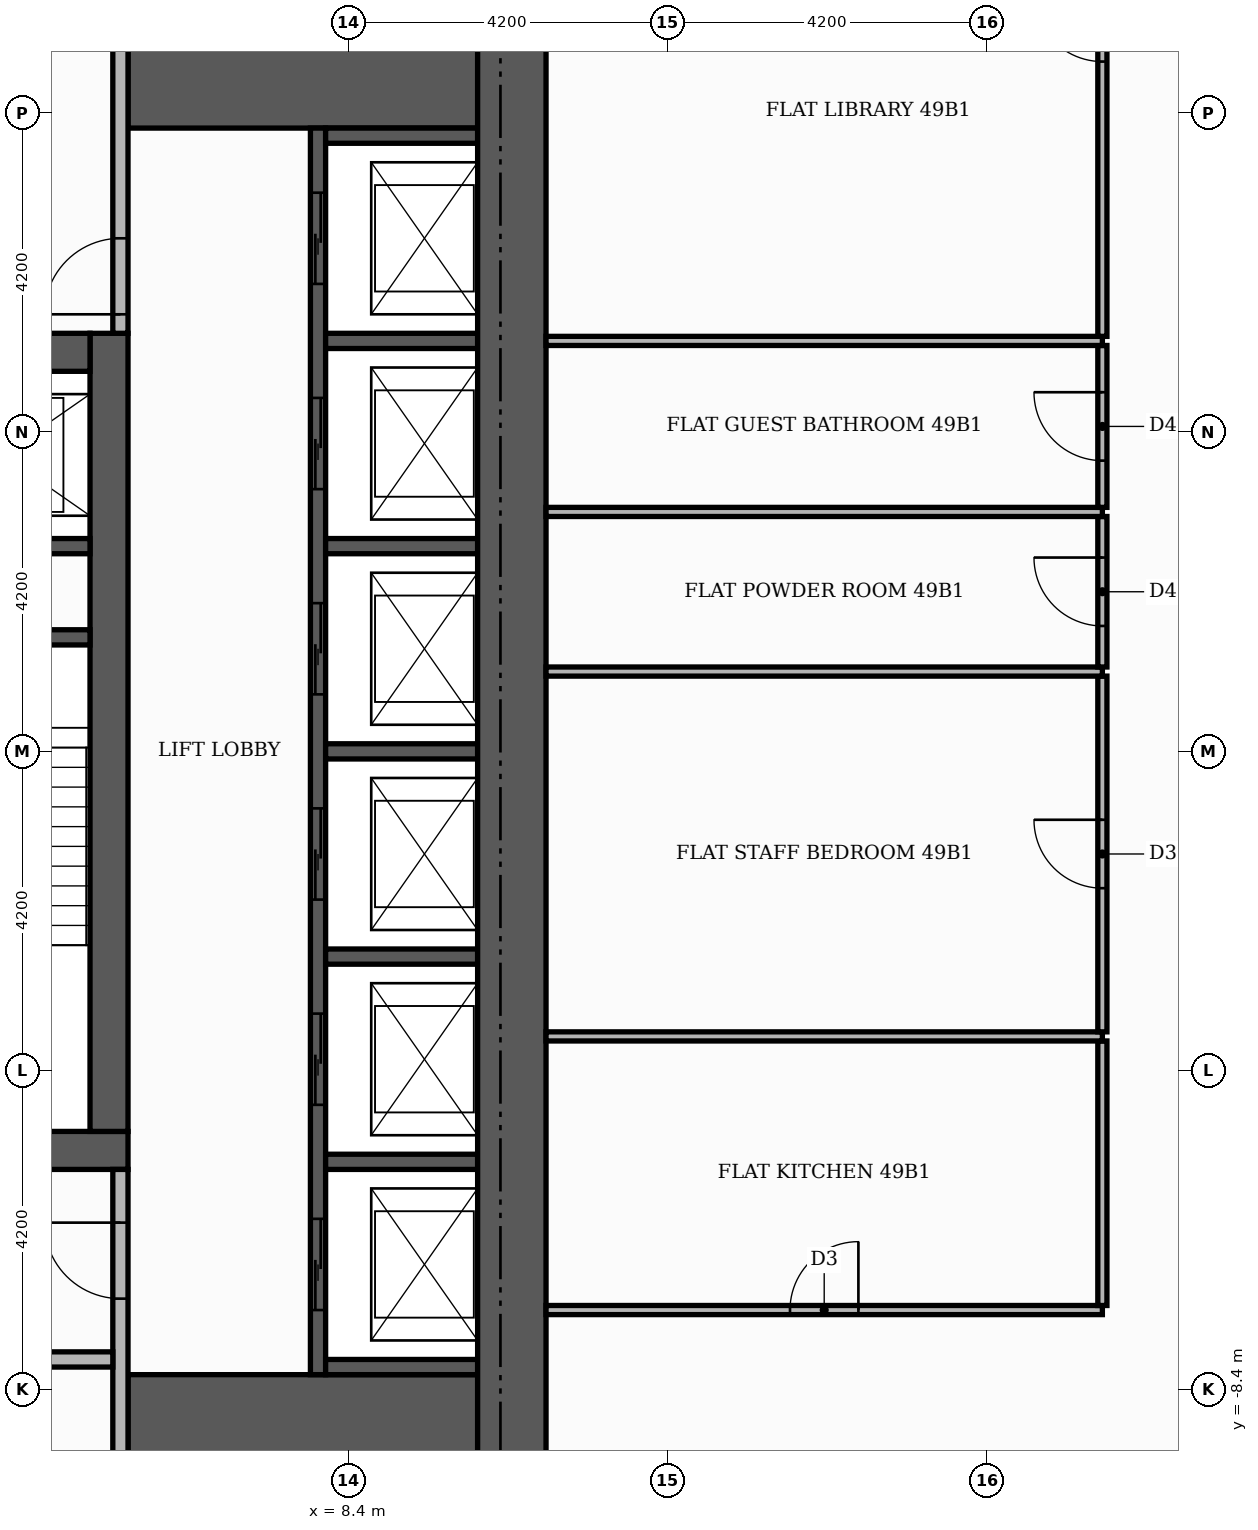
"""IFC4 building model, lengths in metres.
Left out: names, types, materials, properties, quantities, classifications, styles, units other than length and angle.
Written with IfcOpenShell. Run it as: python <this file> out.ifc"""

import sys

from ifc_helpers import new_model, si_unit, direction, frame, frame_2d, origin, place, context, subcontext, project, spatial, rectangle, extrude, element, fill, save


model = new_model("IFC4")
c1 = context("Model", 3, precision=1e-05, world=origin(), true_north=direction((0.0, 1.0)))
c2 = subcontext(c1, "Body", "Model", "MODEL_VIEW")
j1 = project(units=[si_unit("LENGTHUNIT", "METRE"), si_unit("PLANEANGLEUNIT", "RADIAN")], contexts=[c1])
p1 = place(None, origin())
s1 = spatial("IfcSite", under=j1, at=p1, CompositionType="ELEMENT")
p2 = place(p1, origin())
s2 = spatial("IfcBuilding", under=s1, at=p2, CompositionType="ELEMENT")
p3 = place(p2, frame((0.0, 0.0, 207.9)))
s3 = spatial("IfcBuildingStorey", under=s2, at=p3, CompositionType="ELEMENT", Elevation=207.9)
p4 = place(p3, frame((-5.5, -5.25, 0.0), z_axis=(0.0, 0.0, 1.0), x_axis=(1.0, 0.0, 0.0)))
e1 = element("IfcWall", 1, at=p4, inside=s3, PredefinedType="SHEAR", context=c2, shape_type="SweptSolid", body=[
    extrude(rectangle(XDim=11.0, YDim=0.5, at=frame_2d((5.5, 0.0))), origin(), (0.0, 0.0, 1.0), 3.48),
])
p5 = place(p4, frame((4.9, 0.0, 0.0)))
e2 = element("IfcOpeningElement", 2, at=p5, cuts=e1, PredefinedType="OPENING", context=c2, shape_type="SweptSolid", body=[
    extrude(rectangle(XDim=1.2, YDim=2.1, at=frame_2d((0.6, 1.05))), frame((0.0, 0.26, 0.0), z_axis=(0.0, -1.0, 0.0), x_axis=(1.0, 0.0, 0.0)), (0.0, 0.0, 1.0), 0.52),
])
p6 = place(p3, frame((5.25, -5.0, 0.0), z_axis=(0.0, 0.0, 1.0), x_axis=(0.0, 1.0, 0.0)))
e3 = element("IfcWall", 3, at=p6, inside=s3, PredefinedType="SHEAR", context=c2, shape_type="SweptSolid", body=[
    extrude(rectangle(XDim=10.5, YDim=0.5, at=frame_2d((5.25, 0.0))), origin(), (0.0, 0.0, 1.0), 3.48),
])
p7 = place(p3, frame((-5.0, 5.25, 0.0), z_axis=(0.0, 0.0, 1.0), x_axis=(1.0, 0.0, 0.0)))
e4 = element("IfcWall", 4, at=p7, inside=s3, PredefinedType="SHEAR", context=c2, shape_type="SweptSolid", body=[
    extrude(rectangle(XDim=10.0, YDim=0.5, at=frame_2d((5.0, 0.0))), origin(), (0.0, 0.0, 1.0), 3.48),
])
p8 = place(p7, frame((4.4, 0.0, 0.0)))
e5 = element("IfcOpeningElement", 5, at=p8, cuts=e4, PredefinedType="OPENING", context=c2, shape_type="SweptSolid", body=[
    extrude(rectangle(XDim=1.2, YDim=2.1, at=frame_2d((0.6, 1.05))), frame((0.0, 0.26, 0.0), z_axis=(0.0, -1.0, 0.0), x_axis=(1.0, 0.0, 0.0)), (0.0, 0.0, 1.0), 0.52),
])
for number, where, z_axis, x_axis in (
    (6, (5.5, -9.15, 0.0), (0.0, 0.0, 1.0), (1.0, 0.0, 0.0)),
    (7, (5.5, 9.15, 0.0), (0.0, 0.0, 1.0), (1.0, 0.0, 0.0)),
):
    element("IfcWall", number, at=place(p3, frame(where, z_axis=z_axis, x_axis=x_axis)), inside=s3, PredefinedType="SHEAR", context=c2, shape_type="SweptSolid", body=[
        extrude(rectangle(XDim=4.6, YDim=1.9, at=frame_2d((2.3, 0.0))), origin(), (0.0, 0.0, 1.0), 3.48),
    ])
p9 = place(p3, frame((2.15, 1.5, 0.0), z_axis=(0.0, 0.0, 1.0), x_axis=(1.0, 0.0, 0.0)))
e8 = element("IfcWall", 8, at=p9, inside=s3, PredefinedType="SHEAR", context=c2, shape_type="SweptSolid", body=[
    extrude(rectangle(XDim=2.85, YDim=0.2, at=frame_2d((1.425, 0.0))), origin(), (0.0, 0.0, 1.0), 3.48),
])
p10 = place(p3, frame((8.0, -8.2, 0.0), z_axis=(0.0, 0.0, 1.0), x_axis=(0.0, 1.0, 0.0)))
e9 = element("IfcWall", 9, at=p10, inside=s3, PredefinedType="SHEAR", context=c2, shape_type="SweptSolid", body=[
    extrude(rectangle(XDim=16.4, YDim=0.2, at=frame_2d((8.2, 0.0))), origin(), (0.0, 0.0, 1.0), 3.48),
])
p11 = place(p10, frame((0.85, 0.0, 0.0)))
e10 = element("IfcOpeningElement", 10, at=p11, cuts=e9, PredefinedType="OPENING", context=c2, shape_type="SweptSolid", body=[
    extrude(rectangle(XDim=1.2, YDim=2.1, at=frame_2d((0.6, 1.05))), frame((0.0, 0.11, 0.0), z_axis=(0.0, -1.0, 0.0), x_axis=(1.0, 0.0, 0.0)), (0.0, 0.0, 1.0), 0.22),
])
p12 = place(p10, frame((3.55, 0.0, 0.0)))
e11 = element("IfcOpeningElement", 11, at=p12, cuts=e9, PredefinedType="OPENING", context=c2, shape_type="SweptSolid", body=[
    extrude(rectangle(XDim=1.2, YDim=2.1, at=frame_2d((0.6, 1.05))), frame((0.0, 0.11, 0.0), z_axis=(0.0, -1.0, 0.0), x_axis=(1.0, 0.0, 0.0)), (0.0, 0.0, 1.0), 0.22),
])
p13 = place(p10, frame((6.25, 0.0, 0.0)))
e12 = element("IfcOpeningElement", 12, at=p13, cuts=e9, PredefinedType="OPENING", context=c2, shape_type="SweptSolid", body=[
    extrude(rectangle(XDim=1.2, YDim=2.1, at=frame_2d((0.6, 1.05))), frame((0.0, 0.11, 0.0), z_axis=(0.0, -1.0, 0.0), x_axis=(1.0, 0.0, 0.0)), (0.0, 0.0, 1.0), 0.22),
])
p14 = place(p10, frame((8.95, 0.0, 0.0)))
e13 = element("IfcOpeningElement", 13, at=p14, cuts=e9, PredefinedType="OPENING", context=c2, shape_type="SweptSolid", body=[
    extrude(rectangle(XDim=1.2, YDim=2.1, at=frame_2d((0.6, 1.05))), frame((0.0, 0.11, 0.0), z_axis=(0.0, -1.0, 0.0), x_axis=(1.0, 0.0, 0.0)), (0.0, 0.0, 1.0), 0.22),
])
p15 = place(p10, frame((11.65, 0.0, 0.0)))
e14 = element("IfcOpeningElement", 14, at=p15, cuts=e9, PredefinedType="OPENING", context=c2, shape_type="SweptSolid", body=[
    extrude(rectangle(XDim=1.2, YDim=2.1, at=frame_2d((0.6, 1.05))), frame((0.0, 0.11, 0.0), z_axis=(0.0, -1.0, 0.0), x_axis=(1.0, 0.0, 0.0)), (0.0, 0.0, 1.0), 0.22),
])
p16 = place(p10, frame((14.35, 0.0, 0.0)))
e15 = element("IfcOpeningElement", 15, at=p16, cuts=e9, PredefinedType="OPENING", context=c2, shape_type="SweptSolid", body=[
    extrude(rectangle(XDim=1.2, YDim=2.1, at=frame_2d((0.6, 1.05))), frame((0.0, 0.11, 0.0), z_axis=(0.0, -1.0, 0.0), x_axis=(1.0, 0.0, 0.0)), (0.0, 0.0, 1.0), 0.22),
])
for number, where, z_axis, x_axis in (
    (16, (8.1, -8.1, 0.0), (0.0, 0.0, 1.0), (1.0, 0.0, 0.0)),
    (17, (8.1, -5.4, 0.0), (0.0, 0.0, 1.0), (1.0, 0.0, 0.0)),
    (18, (8.1, -2.7, 0.0), (0.0, 0.0, 1.0), (1.0, 0.0, 0.0)),
    (19, (8.1, 0.0, 0.0), (0.0, 0.0, 1.0), (1.0, 0.0, 0.0)),
):
    element("IfcWall", number, at=place(p3, frame(where, z_axis=z_axis, x_axis=x_axis)), inside=s3, PredefinedType="SHEAR", context=c2, shape_type="SweptSolid", body=[
        extrude(rectangle(XDim=2.0, YDim=0.2, at=frame_2d((1.0, 0.0))), origin(), (0.0, 0.0, 1.0), 3.48),
    ])
p17 = place(p3, frame((2.15, 2.7, 0.0), z_axis=(0.0, 0.0, 1.0), x_axis=(1.0, 0.0, 0.0)))
e20 = element("IfcWall", 20, at=p17, inside=s3, PredefinedType="SHEAR", context=c2, shape_type="SweptSolid", body=[
    extrude(rectangle(XDim=2.85, YDim=0.2, at=frame_2d((1.425, 0.0))), origin(), (0.0, 0.0, 1.0), 3.48),
])
for number, where, z_axis, x_axis in (
    (21, (8.1, 2.7, 0.0), (0.0, 0.0, 1.0), (1.0, 0.0, 0.0)),
    (22, (8.1, 5.4, 0.0), (0.0, 0.0, 1.0), (1.0, 0.0, 0.0)),
    (23, (8.1, 8.1, 0.0), (0.0, 0.0, 1.0), (1.0, 0.0, 0.0)),
):
    element("IfcWall", number, at=place(p3, frame(where, z_axis=z_axis, x_axis=x_axis)), inside=s3, PredefinedType="SHEAR", context=c2, shape_type="SweptSolid", body=[
        extrude(rectangle(XDim=2.0, YDim=0.2, at=frame_2d((1.0, 0.0))), origin(), (0.0, 0.0, 1.0), 3.48),
    ])
p18 = place(p3, frame((10.55, -10.1, 0.0), z_axis=(0.0, 0.0, 1.0), x_axis=(0.0, 1.0, 0.0)))
e24 = element("IfcWall", 24, at=p18, inside=s3, PredefinedType="SHEAR", context=c2, shape_type="SweptSolid", body=[
    extrude(rectangle(XDim=20.2, YDim=0.9, at=frame_2d((10.1, 0.0))), origin(), (0.0, 0.0, 1.0), 3.48),
])
p19 = place(p3, frame((5.4, -10.1, 0.0), z_axis=(0.0, 0.0, 1.0), x_axis=(0.0, 1.0, 0.0)))
e25 = element("IfcWall", 25, at=p19, inside=s3, PredefinedType="PARTITIONING", context=c2, shape_type="SweptSolid", body=[
    extrude(rectangle(XDim=4.6, YDim=0.2, at=frame_2d((2.3, 0.0))), origin(), (0.0, 0.0, 1.0), 3.48),
])
p20 = place(p19, frame((2.9, 0.0, 0.0)))
e26 = element("IfcOpeningElement", 26, at=p20, cuts=e25, PredefinedType="OPENING", context=c2, shape_type="SweptSolid", body=[
    extrude(rectangle(XDim=1.0, YDim=2.1, at=frame_2d((0.5, 1.05))), frame((0.0, 0.11, 0.0), z_axis=(0.0, -1.0, 0.0), x_axis=(1.0, 0.0, 0.0)), (0.0, 0.0, 1.0), 0.22),
])
p21 = place(p3, frame((2.35, -8.0, 0.0), z_axis=(0.0, 0.0, 1.0), x_axis=(1.0, 0.0, 0.0)))
e27 = element("IfcWall", 27, at=p21, inside=s3, PredefinedType="PARTITIONING", context=c2, shape_type="SweptSolid", body=[
    extrude(rectangle(XDim=2.95, YDim=0.2, at=frame_2d((1.475, 0.0))), origin(), (0.0, 0.0, 1.0), 3.48),
])
p22 = place(p21, frame((1.0, 0.0, 0.0)))
e28 = element("IfcOpeningElement", 28, at=p22, cuts=e27, PredefinedType="OPENING", context=c2, shape_type="SweptSolid", body=[
    extrude(rectangle(XDim=0.9, YDim=2.1, at=frame_2d((0.45, 1.05))), frame((0.0, 0.11, 0.0), z_axis=(0.0, -1.0, 0.0), x_axis=(1.0, 0.0, 0.0)), (0.0, 0.0, 1.0), 0.22),
])
p23 = place(p3, frame((5.4, 5.5, 0.0), z_axis=(0.0, 0.0, 1.0), x_axis=(0.0, 1.0, 0.0)))
e29 = element("IfcWall", 29, at=p23, inside=s3, PredefinedType="PARTITIONING", context=c2, shape_type="SweptSolid", body=[
    extrude(rectangle(XDim=4.6, YDim=0.2, at=frame_2d((2.3, 0.0))), origin(), (0.0, 0.0, 1.0), 3.48),
])
p24 = place(p23, frame((0.25, 0.0, 0.0)))
e30 = element("IfcOpeningElement", 30, at=p24, cuts=e29, PredefinedType="OPENING", context=c2, shape_type="SweptSolid", body=[
    extrude(rectangle(XDim=1.0, YDim=2.1, at=frame_2d((0.5, 1.05))), frame((0.0, 0.11, 0.0), z_axis=(0.0, -1.0, 0.0), x_axis=(1.0, 0.0, 0.0)), (0.0, 0.0, 1.0), 0.22),
])
p25 = place(p3, frame((11.0, -7.35, 0.0), z_axis=(0.0, 0.0, 1.0), x_axis=(1.0, 0.0, 0.0)))
e31 = element("IfcWall", 31, at=p25, inside=s3, PredefinedType="PARTITIONING", context=c2, shape_type="SweptSolid", body=[
    extrude(rectangle(XDim=7.32, YDim=0.12, at=frame_2d((3.66, 0.0))), origin(), (0.0, 0.0, 1.0), 3.48),
])
p26 = place(p25, frame((3.21, 0.0, 0.0)))
e32 = element("IfcOpeningElement", 32, at=p26, cuts=e31, PredefinedType="OPENING", context=c2, shape_type="SweptSolid", body=[
    extrude(rectangle(XDim=0.9, YDim=2.1, at=frame_2d((0.45, 1.05))), frame((0.0, 0.07, 0.0), z_axis=(0.0, -1.0, 0.0), x_axis=(1.0, 0.0, 0.0)), (0.0, 0.0, 1.0), 0.14),
])
p27 = place(p3, frame((18.32, -7.29, 0.0), z_axis=(0.0, 0.0, 1.0), x_axis=(0.0, 1.0, 0.0)))
e33 = element("IfcWall", 33, at=p27, inside=s3, PredefinedType="PARTITIONING", context=c2, shape_type="SweptSolid", body=[
    extrude(rectangle(XDim=3.48, YDim=0.12, at=frame_2d((1.74, 0.0))), origin(), (0.0, 0.0, 1.0), 3.48),
])
p28 = place(p3, frame((11.0, -3.75, 0.0), z_axis=(0.0, 0.0, 1.0), x_axis=(1.0, 0.0, 0.0)))
e34 = element("IfcWall", 34, at=p28, inside=s3, PredefinedType="PARTITIONING", context=c2, shape_type="SweptSolid", body=[
    extrude(rectangle(XDim=7.32, YDim=0.12, at=frame_2d((3.66, 0.0))), origin(), (0.0, 0.0, 1.0), 3.48),
])
p29 = place(p3, frame((18.32, -3.69, 0.0), z_axis=(0.0, 0.0, 1.0), x_axis=(0.0, 1.0, 0.0)))
e35 = element("IfcWall", 35, at=p29, inside=s3, PredefinedType="PARTITIONING", context=c2, shape_type="SweptSolid", body=[
    extrude(rectangle(XDim=4.68, YDim=0.12, at=frame_2d((2.34, 0.0))), origin(), (0.0, 0.0, 1.0), 3.48),
])
p30 = place(p29, frame((1.89, 0.0, 0.0)))
e36 = element("IfcOpeningElement", 36, at=p30, cuts=e35, PredefinedType="OPENING", context=c2, shape_type="SweptSolid", body=[
    extrude(rectangle(XDim=0.9, YDim=2.1, at=frame_2d((0.45, 1.05))), frame((0.0, 0.07, 0.0), z_axis=(0.0, -1.0, 0.0), x_axis=(1.0, 0.0, 0.0)), (0.0, 0.0, 1.0), 0.14),
])
p31 = place(p3, frame((11.0, 1.05, 0.0), z_axis=(0.0, 0.0, 1.0), x_axis=(1.0, 0.0, 0.0)))
e37 = element("IfcWall", 37, at=p31, inside=s3, PredefinedType="PARTITIONING", context=c2, shape_type="SweptSolid", body=[
    extrude(rectangle(XDim=7.32, YDim=0.12, at=frame_2d((3.66, 0.0))), origin(), (0.0, 0.0, 1.0), 3.48),
])
p32 = place(p3, frame((18.32, 1.11, 0.0), z_axis=(0.0, 0.0, 1.0), x_axis=(0.0, 1.0, 0.0)))
e38 = element("IfcWall", 38, at=p32, inside=s3, PredefinedType="PARTITIONING", context=c2, shape_type="SweptSolid", body=[
    extrude(rectangle(XDim=1.98, YDim=0.12, at=frame_2d((0.99, 0.0))), origin(), (0.0, 0.0, 1.0), 3.48),
])
p33 = place(p32, frame((0.54, 0.0, 0.0)))
e39 = element("IfcOpeningElement", 39, at=p33, cuts=e38, PredefinedType="OPENING", context=c2, shape_type="SweptSolid", body=[
    extrude(rectangle(XDim=0.9, YDim=2.1, at=frame_2d((0.45, 1.05))), frame((0.0, 0.07, 0.0), z_axis=(0.0, -1.0, 0.0), x_axis=(1.0, 0.0, 0.0)), (0.0, 0.0, 1.0), 0.14),
])
p34 = place(p3, frame((11.0, 3.15, 0.0), z_axis=(0.0, 0.0, 1.0), x_axis=(1.0, 0.0, 0.0)))
e40 = element("IfcWall", 40, at=p34, inside=s3, PredefinedType="PARTITIONING", context=c2, shape_type="SweptSolid", body=[
    extrude(rectangle(XDim=7.32, YDim=0.12, at=frame_2d((3.66, 0.0))), origin(), (0.0, 0.0, 1.0), 3.48),
])
p35 = place(p3, frame((18.32, 3.21, 0.0), z_axis=(0.0, 0.0, 1.0), x_axis=(0.0, 1.0, 0.0)))
e41 = element("IfcWall", 41, at=p35, inside=s3, PredefinedType="PARTITIONING", context=c2, shape_type="SweptSolid", body=[
    extrude(rectangle(XDim=2.13, YDim=0.12, at=frame_2d((1.065, 0.0))), origin(), (0.0, 0.0, 1.0), 3.48),
])
p36 = place(p35, frame((0.615, 0.0, 0.0)))
e42 = element("IfcOpeningElement", 42, at=p36, cuts=e41, PredefinedType="OPENING", context=c2, shape_type="SweptSolid", body=[
    extrude(rectangle(XDim=0.9, YDim=2.1, at=frame_2d((0.45, 1.05))), frame((0.0, 0.07, 0.0), z_axis=(0.0, -1.0, 0.0), x_axis=(1.0, 0.0, 0.0)), (0.0, 0.0, 1.0), 0.14),
])
p37 = place(p3, frame((11.0, 5.4, 0.0), z_axis=(0.0, 0.0, 1.0), x_axis=(1.0, 0.0, 0.0)))
e43 = element("IfcWall", 43, at=p37, inside=s3, PredefinedType="PARTITIONING", context=c2, shape_type="SweptSolid", body=[
    extrude(rectangle(XDim=7.32, YDim=0.12, at=frame_2d((3.66, 0.0))), origin(), (0.0, 0.0, 1.0), 3.48),
])
p38 = place(p3, frame((18.32, 5.46, 0.0), z_axis=(0.0, 0.0, 1.0), x_axis=(0.0, 1.0, 0.0)))
e44 = element("IfcWall", 44, at=p38, inside=s3, PredefinedType="PARTITIONING", context=c2, shape_type="SweptSolid", body=[
    extrude(rectangle(XDim=8.09, YDim=0.12, at=frame_2d((4.045, 0.0))), origin(), (0.0, 0.0, 1.0), 3.48),
])
p39 = place(p38, frame((3.615, 0.0, 0.0)))
e45 = element("IfcOpeningElement", 45, at=p39, cuts=e44, PredefinedType="OPENING", context=c2, shape_type="SweptSolid", body=[
    extrude(rectangle(XDim=0.9, YDim=2.1, at=frame_2d((0.45, 1.05))), frame((0.0, 0.07, 0.0), z_axis=(0.0, -1.0, 0.0), x_axis=(1.0, 0.0, 0.0)), (0.0, 0.0, 1.0), 0.14),
])
p40 = place(p11, origin())
e46 = element("IfcDoor", 46, at=p40, inside=s3, OperationType="SLIDING_TO_LEFT", PredefinedType="DOOR", context=c2, shape_type="SweptSolid", body=[
    extrude(rectangle(XDim=1.2, YDim=2.1, at=frame_2d((0.6, 1.05))), frame((0.0, 0.025, 0.0), z_axis=(0.0, -1.0, 0.0), x_axis=(1.0, 0.0, 0.0)), (0.0, 0.0, 1.0), 0.05),
])
fill(e10, e46)
p41 = place(p12, origin())
e47 = element("IfcDoor", 47, at=p41, inside=s3, OperationType="SLIDING_TO_LEFT", PredefinedType="DOOR", context=c2, shape_type="SweptSolid", body=[
    extrude(rectangle(XDim=1.2, YDim=2.1, at=frame_2d((0.6, 1.05))), frame((0.0, 0.025, 0.0), z_axis=(0.0, -1.0, 0.0), x_axis=(1.0, 0.0, 0.0)), (0.0, 0.0, 1.0), 0.05),
])
fill(e11, e47)
p42 = place(p13, origin())
e48 = element("IfcDoor", 48, at=p42, inside=s3, OperationType="SLIDING_TO_LEFT", PredefinedType="DOOR", context=c2, shape_type="SweptSolid", body=[
    extrude(rectangle(XDim=1.2, YDim=2.1, at=frame_2d((0.6, 1.05))), frame((0.0, 0.025, 0.0), z_axis=(0.0, -1.0, 0.0), x_axis=(1.0, 0.0, 0.0)), (0.0, 0.0, 1.0), 0.05),
])
fill(e12, e48)
p43 = place(p14, origin())
e49 = element("IfcDoor", 49, at=p43, inside=s3, OperationType="SLIDING_TO_LEFT", PredefinedType="DOOR", context=c2, shape_type="SweptSolid", body=[
    extrude(rectangle(XDim=1.2, YDim=2.1, at=frame_2d((0.6, 1.05))), frame((0.0, 0.025, 0.0), z_axis=(0.0, -1.0, 0.0), x_axis=(1.0, 0.0, 0.0)), (0.0, 0.0, 1.0), 0.05),
])
fill(e13, e49)
p44 = place(p15, origin())
e50 = element("IfcDoor", 50, at=p44, inside=s3, OperationType="SLIDING_TO_LEFT", PredefinedType="DOOR", context=c2, shape_type="SweptSolid", body=[
    extrude(rectangle(XDim=1.2, YDim=2.1, at=frame_2d((0.6, 1.05))), frame((0.0, 0.025, 0.0), z_axis=(0.0, -1.0, 0.0), x_axis=(1.0, 0.0, 0.0)), (0.0, 0.0, 1.0), 0.05),
])
fill(e14, e50)
p45 = place(p16, origin())
e51 = element("IfcDoor", 51, at=p45, inside=s3, OperationType="SLIDING_TO_LEFT", PredefinedType="DOOR", context=c2, shape_type="SweptSolid", body=[
    extrude(rectangle(XDim=1.2, YDim=2.1, at=frame_2d((0.6, 1.05))), frame((0.0, 0.025, 0.0), z_axis=(0.0, -1.0, 0.0), x_axis=(1.0, 0.0, 0.0)), (0.0, 0.0, 1.0), 0.05),
])
fill(e15, e51)
p46 = place(p24, origin())
e52 = element("IfcDoor", 52, at=p46, inside=s3, OperationType="SINGLE_SWING_LEFT", PredefinedType="DOOR", context=c2, shape_type="SweptSolid", body=[
    extrude(rectangle(XDim=1.0, YDim=2.1, at=frame_2d((0.5, 1.05))), frame((0.0, 0.025, 0.0), z_axis=(0.0, -1.0, 0.0), x_axis=(1.0, 0.0, 0.0)), (0.0, 0.0, 1.0), 0.05),
])
fill(e30, e52)
p47 = place(p20, origin())
e53 = element("IfcDoor", 53, at=p47, inside=s3, OperationType="SINGLE_SWING_RIGHT", PredefinedType="DOOR", context=c2, shape_type="SweptSolid", body=[
    extrude(rectangle(XDim=1.0, YDim=2.1, at=frame_2d((0.5, 1.05))), frame((0.0, 0.025, 0.0), z_axis=(0.0, -1.0, 0.0), x_axis=(1.0, 0.0, 0.0)), (0.0, 0.0, 1.0), 0.05),
])
fill(e26, e53)
p48 = place(p26, origin())
e54 = element("IfcDoor", 54, at=p48, inside=s3, OperationType="SINGLE_SWING_RIGHT", PredefinedType="DOOR", context=c2, shape_type="SweptSolid", body=[
    extrude(rectangle(XDim=0.9, YDim=2.1, at=frame_2d((0.45, 1.05))), frame((0.0, 0.025, 0.0), z_axis=(0.0, -1.0, 0.0), x_axis=(1.0, 0.0, 0.0)), (0.0, 0.0, 1.0), 0.05),
])
fill(e32, e54)
p49 = place(p30, origin())
e55 = element("IfcDoor", 55, at=p49, inside=s3, OperationType="SINGLE_SWING_RIGHT", PredefinedType="DOOR", context=c2, shape_type="SweptSolid", body=[
    extrude(rectangle(XDim=0.9, YDim=2.1, at=frame_2d((0.45, 1.05))), frame((0.0, 0.025, 0.0), z_axis=(0.0, -1.0, 0.0), x_axis=(1.0, 0.0, 0.0)), (0.0, 0.0, 1.0), 0.05),
])
fill(e36, e55)
p50 = place(p33, origin())
e56 = element("IfcDoor", 56, at=p50, inside=s3, OperationType="SINGLE_SWING_RIGHT", PredefinedType="DOOR", context=c2, shape_type="SweptSolid", body=[
    extrude(rectangle(XDim=0.9, YDim=2.1, at=frame_2d((0.45, 1.05))), frame((0.0, 0.025, 0.0), z_axis=(0.0, -1.0, 0.0), x_axis=(1.0, 0.0, 0.0)), (0.0, 0.0, 1.0), 0.05),
])
fill(e39, e56)
p51 = place(p36, origin())
e57 = element("IfcDoor", 57, at=p51, inside=s3, OperationType="SINGLE_SWING_RIGHT", PredefinedType="DOOR", context=c2, shape_type="SweptSolid", body=[
    extrude(rectangle(XDim=0.9, YDim=2.1, at=frame_2d((0.45, 1.05))), frame((0.0, 0.025, 0.0), z_axis=(0.0, -1.0, 0.0), x_axis=(1.0, 0.0, 0.0)), (0.0, 0.0, 1.0), 0.05),
])
fill(e42, e57)
p52 = place(p39, origin())
e58 = element("IfcDoor", 58, at=p52, inside=s3, OperationType="SINGLE_SWING_RIGHT", PredefinedType="DOOR", context=c2, shape_type="SweptSolid", body=[
    extrude(rectangle(XDim=0.9, YDim=2.1, at=frame_2d((0.45, 1.05))), frame((0.0, 0.025, 0.0), z_axis=(0.0, -1.0, 0.0), x_axis=(1.0, 0.0, 0.0)), (0.0, 0.0, 1.0), 0.05),
])
fill(e45, e58)
save(model, sys.argv[1])
